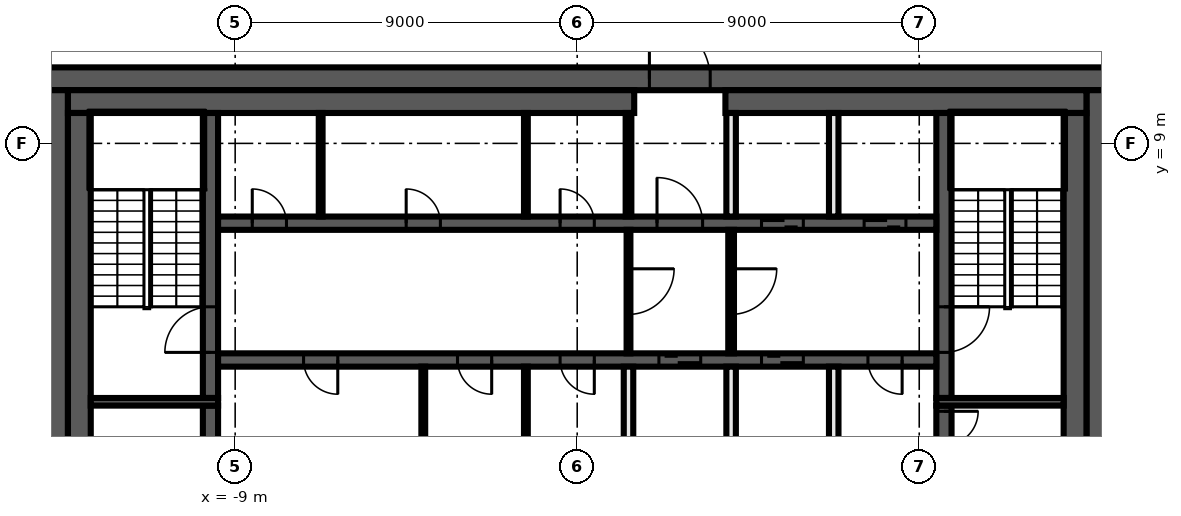
"""IFC4 building model, lengths in metres.
Left out: names, types, materials, properties, quantities, classifications, styles, units other than length and angle.
Written with IfcOpenShell. Run it as: python <this file> out.ifc"""

import sys

from ifc_helpers import new_model, si_unit, direction, frame, frame_2d, origin, place, context, subcontext, project, spatial, rectangle, extrude, element, fill, save


model = new_model("IFC4")
c1 = context("Model", 3, precision=1e-05, world=origin(), true_north=direction((0.0, 1.0)))
c2 = subcontext(c1, "Body", "Model", "MODEL_VIEW")
j1 = project(units=[si_unit("LENGTHUNIT", "METRE"), si_unit("PLANEANGLEUNIT", "RADIAN")], contexts=[c1])
p1 = place(None, origin())
s1 = spatial("IfcSite", under=j1, at=p1, CompositionType="ELEMENT")
p2 = place(p1, origin())
s2 = spatial("IfcBuilding", under=s1, at=p2, CompositionType="ELEMENT")
p3 = place(p2, frame((0.0, 0.0, 311.0)))
s3 = spatial("IfcBuildingStorey", under=s2, at=p3, CompositionType="ELEMENT", Elevation=311.0)
p4 = place(p3, frame((-14.0, 10.7, 0.0), z_axis=(0.0, 0.0, 1.0), x_axis=(1.0, 0.0, 0.0)))
e1 = element("IfcWall", 1, at=p4, inside=s3, PredefinedType="SHEAR", context=c2, shape_type="SweptSolid", body=[
    extrude(rectangle(XDim=28.0, YDim=0.6, at=frame_2d((14.0, 0.0))), origin(), (0.0, 0.0, 1.0), 3.82),
])
p5 = place(p4, frame((15.9, 0.0, 0.0)))
e2 = element("IfcOpeningElement", 2, at=p5, cuts=e1, PredefinedType="OPENING", context=c2, shape_type="SweptSolid", body=[
    extrude(rectangle(XDim=1.6, YDim=2.1, at=frame_2d((0.8, 1.05))), frame((0.0, 0.31, 0.0), z_axis=(0.0, -1.0, 0.0), x_axis=(1.0, 0.0, 0.0)), (0.0, 0.0, 1.0), 0.62),
])
for number, where, z_axis, x_axis in (
    (3, (13.7, 10.4, 0.0), (0.0, 0.0, 1.0), (0.0, -1.0, 0.0)),
    (4, (-13.7, -10.4, 0.0), (0.0, 0.0, 1.0), (0.0, 1.0, 0.0)),
):
    element("IfcWall", number, at=place(p3, frame(where, z_axis=z_axis, x_axis=x_axis)), inside=s3, PredefinedType="SHEAR", context=c2, shape_type="SweptSolid", body=[
        extrude(rectangle(XDim=20.8, YDim=0.6, at=frame_2d((10.4, 0.0))), origin(), (0.0, 0.0, 1.0), 3.82),
    ])
p6 = place(p3, frame((-13.4, 10.1, 0.0), z_axis=(0.0, 0.0, 1.0), x_axis=(1.0, 0.0, 0.0)))
e5 = element("IfcWall", 5, at=p6, inside=s3, PredefinedType="SHEAR", context=c2, shape_type="SweptSolid", body=[
    extrude(rectangle(XDim=14.9, YDim=0.6, at=frame_2d((7.45, 0.0))), origin(), (0.0, 0.0, 1.0), 3.82),
])
p7 = place(p3, frame((3.9, 10.1, 0.0), z_axis=(0.0, 0.0, 1.0), x_axis=(1.0, 0.0, 0.0)))
e6 = element("IfcWall", 6, at=p7, inside=s3, PredefinedType="SHEAR", context=c2, shape_type="SweptSolid", body=[
    extrude(rectangle(XDim=9.5, YDim=0.6, at=frame_2d((4.75, 0.0))), origin(), (0.0, 0.0, 1.0), 3.82),
])
for number, where, z_axis, x_axis in (
    (7, (13.1, 9.8, 0.0), (0.0, 0.0, 1.0), (0.0, -1.0, 0.0)),
    (8, (-13.1, -9.8, 0.0), (0.0, 0.0, 1.0), (0.0, 1.0, 0.0)),
):
    element("IfcWall", number, at=place(p3, frame(where, z_axis=z_axis, x_axis=x_axis)), inside=s3, PredefinedType="SHEAR", context=c2, shape_type="SweptSolid", body=[
        extrude(rectangle(XDim=19.6, YDim=0.6, at=frame_2d((9.8, 0.0))), origin(), (0.0, 0.0, 1.0), 3.82),
    ])
p8 = place(p3, frame((9.65, 2.1, 0.0), z_axis=(0.0, 0.0, 1.0), x_axis=(0.0, -1.0, 0.0)))
e9 = element("IfcWall", 9, at=p8, inside=s3, PredefinedType="SHEAR", context=c2, shape_type="SweptSolid", body=[
    extrude(rectangle(XDim=4.2, YDim=0.4, at=frame_2d((2.1, 0.0))), origin(), (0.0, 0.0, 1.0), 3.82),
])
p9 = place(p8, frame((0.15, 0.0, 0.0)))
e10 = element("IfcOpeningElement", 10, at=p9, cuts=e9, PredefinedType="OPENING", context=c2, shape_type="SweptSolid", body=[
    extrude(rectangle(XDim=0.9, YDim=2.1, at=frame_2d((0.45, 1.05))), frame((0.0, 0.21, 0.0), z_axis=(0.0, -1.0, 0.0), x_axis=(1.0, 0.0, 0.0)), (0.0, 0.0, 1.0), 0.42),
])
p10 = place(p3, frame((9.65, 9.8, 0.0), z_axis=(0.0, 0.0, 1.0), x_axis=(0.0, -1.0, 0.0)))
e11 = element("IfcWall", 11, at=p10, inside=s3, PredefinedType="SHEAR", context=c2, shape_type="SweptSolid", body=[
    extrude(rectangle(XDim=7.5, YDim=0.4, at=frame_2d((3.75, 0.0))), origin(), (0.0, 0.0, 1.0), 3.82),
])
p11 = place(p10, frame((5.1, 0.0, 0.0)))
e12 = element("IfcOpeningElement", 12, at=p11, cuts=e11, PredefinedType="OPENING", context=c2, shape_type="SweptSolid", body=[
    extrude(rectangle(XDim=1.2, YDim=2.1, at=frame_2d((0.6, 1.05))), frame((0.0, 0.21, 0.0), z_axis=(0.0, -1.0, 0.0), x_axis=(1.0, 0.0, 0.0)), (0.0, 0.0, 1.0), 0.42),
])
p12 = place(p3, frame((-9.65, -2.1, 0.0), z_axis=(0.0, 0.0, 1.0), x_axis=(0.0, 1.0, 0.0)))
e13 = element("IfcWall", 13, at=p12, inside=s3, PredefinedType="SHEAR", context=c2, shape_type="SweptSolid", body=[
    extrude(rectangle(XDim=4.2, YDim=0.4, at=frame_2d((2.1, 0.0))), origin(), (0.0, 0.0, 1.0), 3.82),
])
p13 = place(p3, frame((-9.65, 2.3, 0.0), z_axis=(0.0, 0.0, 1.0), x_axis=(0.0, 1.0, 0.0)))
e14 = element("IfcWall", 14, at=p13, inside=s3, PredefinedType="SHEAR", context=c2, shape_type="SweptSolid", body=[
    extrude(rectangle(XDim=7.5, YDim=0.4, at=frame_2d((3.75, 0.0))), origin(), (0.0, 0.0, 1.0), 3.82),
])
p14 = place(p13, frame((1.2, 0.0, 0.0)))
e15 = element("IfcOpeningElement", 15, at=p14, cuts=e14, PredefinedType="OPENING", context=c2, shape_type="SweptSolid", body=[
    extrude(rectangle(XDim=1.2, YDim=2.1, at=frame_2d((0.6, 1.05))), frame((0.0, 0.21, 0.0), z_axis=(0.0, -1.0, 0.0), x_axis=(1.0, 0.0, 0.0)), (0.0, 0.0, 1.0), 0.42),
])
for number, where, z_axis, x_axis in (
    (16, (9.45, 2.2, 0.0), (0.0, 0.0, 1.0), (1.0, 0.0, 0.0)),
    (17, (-9.45, 2.2, 0.0), (0.0, 0.0, 1.0), (-1.0, 0.0, 0.0)),
):
    element("IfcWall", number, at=place(p3, frame(where, z_axis=z_axis, x_axis=x_axis)), inside=s3, PredefinedType="SHEAR", context=c2, shape_type="SweptSolid", body=[
        extrude(rectangle(XDim=3.35, YDim=0.2, at=frame_2d((1.675, 0.0))), origin(), (0.0, 0.0, 1.0), 3.82),
    ])
p15 = place(p3, frame((-9.45, 6.9, 0.0), z_axis=(0.0, 0.0, 1.0), x_axis=(1.0, 0.0, 0.0)))
e18 = element("IfcWall", 18, at=p15, inside=s3, PredefinedType="SHEAR", context=c2, shape_type="SweptSolid", body=[
    extrude(rectangle(XDim=18.9, YDim=0.35, at=frame_2d((9.45, 0.0))), origin(), (0.0, 0.0, 1.0), 3.82),
])
p16 = place(p15, frame((11.55, 0.0, 0.0)))
e19 = element("IfcOpeningElement", 19, at=p16, cuts=e18, PredefinedType="OPENING", context=c2, shape_type="SweptSolid", body=[
    extrude(rectangle(XDim=1.2, YDim=2.1, at=frame_2d((0.6, 1.05))), frame((0.0, 0.185, 0.0), z_axis=(0.0, -1.0, 0.0), x_axis=(1.0, 0.0, 0.0)), (0.0, 0.0, 1.0), 0.37),
])
p17 = place(p15, frame((14.3, 0.0, 0.0)))
e20 = element("IfcOpeningElement", 20, at=p17, cuts=e18, PredefinedType="OPENING", context=c2, shape_type="SweptSolid", body=[
    extrude(rectangle(XDim=1.1, YDim=2.1, at=frame_2d((0.55, 1.05))), frame((0.0, 0.185, 0.0), z_axis=(0.0, -1.0, 0.0), x_axis=(1.0, 0.0, 0.0)), (0.0, 0.0, 1.0), 0.37),
])
p18 = place(p15, frame((17.0, 0.0, 0.0)))
e21 = element("IfcOpeningElement", 21, at=p18, cuts=e18, PredefinedType="OPENING", context=c2, shape_type="SweptSolid", body=[
    extrude(rectangle(XDim=1.1, YDim=2.1, at=frame_2d((0.55, 1.05))), frame((0.0, 0.185, 0.0), z_axis=(0.0, -1.0, 0.0), x_axis=(1.0, 0.0, 0.0)), (0.0, 0.0, 1.0), 0.37),
])
p19 = place(p15, frame((0.9, 0.0, 0.0)))
e22 = element("IfcOpeningElement", 22, at=p19, cuts=e18, PredefinedType="OPENING", context=c2, shape_type="SweptSolid", body=[
    extrude(rectangle(XDim=0.9, YDim=2.1, at=frame_2d((0.45, 1.05))), frame((0.0, 0.185, 0.0), z_axis=(0.0, -1.0, 0.0), x_axis=(1.0, 0.0, 0.0)), (0.0, 0.0, 1.0), 0.37),
])
p20 = place(p15, frame((4.95, 0.0, 0.0)))
e23 = element("IfcOpeningElement", 23, at=p20, cuts=e18, PredefinedType="OPENING", context=c2, shape_type="SweptSolid", body=[
    extrude(rectangle(XDim=0.9, YDim=2.1, at=frame_2d((0.45, 1.05))), frame((0.0, 0.185, 0.0), z_axis=(0.0, -1.0, 0.0), x_axis=(1.0, 0.0, 0.0)), (0.0, 0.0, 1.0), 0.37),
])
p21 = place(p15, frame((9.0, 0.0, 0.0)))
e24 = element("IfcOpeningElement", 24, at=p21, cuts=e18, PredefinedType="OPENING", context=c2, shape_type="SweptSolid", body=[
    extrude(rectangle(XDim=0.9, YDim=2.1, at=frame_2d((0.45, 1.05))), frame((0.0, 0.185, 0.0), z_axis=(0.0, -1.0, 0.0), x_axis=(1.0, 0.0, 0.0)), (0.0, 0.0, 1.0), 0.37),
])
p22 = place(p3, frame((9.45, 3.3, 0.0), z_axis=(0.0, 0.0, 1.0), x_axis=(-1.0, 0.0, 0.0)))
e25 = element("IfcWall", 25, at=p22, inside=s3, PredefinedType="SHEAR", context=c2, shape_type="SweptSolid", body=[
    extrude(rectangle(XDim=18.9, YDim=0.35, at=frame_2d((9.45, 0.0))), origin(), (0.0, 0.0, 1.0), 3.82),
])
p23 = place(p22, frame((6.2, 0.0, 0.0)))
e26 = element("IfcOpeningElement", 26, at=p23, cuts=e25, PredefinedType="OPENING", context=c2, shape_type="SweptSolid", body=[
    extrude(rectangle(XDim=1.1, YDim=2.1, at=frame_2d((0.55, 1.05))), frame((0.0, 0.185, 0.0), z_axis=(0.0, -1.0, 0.0), x_axis=(1.0, 0.0, 0.0)), (0.0, 0.0, 1.0), 0.37),
])
p24 = place(p22, frame((3.5, 0.0, 0.0)))
e27 = element("IfcOpeningElement", 27, at=p24, cuts=e25, PredefinedType="OPENING", context=c2, shape_type="SweptSolid", body=[
    extrude(rectangle(XDim=1.1, YDim=2.1, at=frame_2d((0.55, 1.05))), frame((0.0, 0.185, 0.0), z_axis=(0.0, -1.0, 0.0), x_axis=(1.0, 0.0, 0.0)), (0.0, 0.0, 1.0), 0.37),
])
p25 = place(p22, frame((0.9, 0.0, 0.0)))
e28 = element("IfcOpeningElement", 28, at=p25, cuts=e25, PredefinedType="OPENING", context=c2, shape_type="SweptSolid", body=[
    extrude(rectangle(XDim=0.9, YDim=2.1, at=frame_2d((0.45, 1.05))), frame((0.0, 0.185, 0.0), z_axis=(0.0, -1.0, 0.0), x_axis=(1.0, 0.0, 0.0)), (0.0, 0.0, 1.0), 0.37),
])
p26 = place(p22, frame((15.75, 0.0, 0.0)))
e29 = element("IfcOpeningElement", 29, at=p26, cuts=e25, PredefinedType="OPENING", context=c2, shape_type="SweptSolid", body=[
    extrude(rectangle(XDim=0.9, YDim=2.1, at=frame_2d((0.45, 1.05))), frame((0.0, 0.185, 0.0), z_axis=(0.0, -1.0, 0.0), x_axis=(1.0, 0.0, 0.0)), (0.0, 0.0, 1.0), 0.37),
])
p27 = place(p22, frame((11.7, 0.0, 0.0)))
e30 = element("IfcOpeningElement", 30, at=p27, cuts=e25, PredefinedType="OPENING", context=c2, shape_type="SweptSolid", body=[
    extrude(rectangle(XDim=0.9, YDim=2.1, at=frame_2d((0.45, 1.05))), frame((0.0, 0.185, 0.0), z_axis=(0.0, -1.0, 0.0), x_axis=(1.0, 0.0, 0.0)), (0.0, 0.0, 1.0), 0.37),
])
p28 = place(p22, frame((9.0, 0.0, 0.0)))
e31 = element("IfcOpeningElement", 31, at=p28, cuts=e25, PredefinedType="OPENING", context=c2, shape_type="SweptSolid", body=[
    extrude(rectangle(XDim=0.9, YDim=2.1, at=frame_2d((0.45, 1.05))), frame((0.0, 0.185, 0.0), z_axis=(0.0, -1.0, 0.0), x_axis=(1.0, 0.0, 0.0)), (0.0, 0.0, 1.0), 0.37),
])
for number, where, z_axis, x_axis in (
    (32, (6.75, 0.4, 0.0), (0.0, 0.0, 1.0), (0.0, 1.0, 0.0)),
    (33, (6.75, 7.075, 0.0), (0.0, 0.0, 1.0), (0.0, 1.0, 0.0)),
):
    element("IfcWall", number, at=place(p3, frame(where, z_axis=z_axis, x_axis=x_axis)), inside=s3, PredefinedType="SOLIDWALL", context=c2, shape_type="SweptSolid", body=[
        extrude(rectangle(XDim=2.725, YDim=0.25, at=frame_2d((1.363, 0.0))), origin(), (0.0, 0.0, 1.0), 3.82),
    ])
p29 = place(p3, frame((4.05, 6.725, 0.0), z_axis=(0.0, 0.0, 1.0), x_axis=(0.0, -1.0, 0.0)))
e34 = element("IfcWall", 34, at=p29, inside=s3, PredefinedType="PARTITIONING", context=c2, shape_type="SweptSolid", body=[
    extrude(rectangle(XDim=3.25, YDim=0.15, at=frame_2d((1.625, 0.0))), origin(), (0.0, 0.0, 1.0), 3.82),
])
p30 = place(p29, frame((1.025, 0.0, 0.0)))
e35 = element("IfcOpeningElement", 35, at=p30, cuts=e34, PredefinedType="OPENING", context=c2, shape_type="SweptSolid", body=[
    extrude(rectangle(XDim=1.2, YDim=2.1, at=frame_2d((0.6, 1.05))), frame((0.0, 0.085, 0.0), z_axis=(0.0, -1.0, 0.0), x_axis=(1.0, 0.0, 0.0)), (0.0, 0.0, 1.0), 0.17),
])
for number, where, z_axis, x_axis in (
    (36, (4.05, 0.4, 0.0), (0.0, 0.0, 1.0), (0.0, 1.0, 0.0)),
    (37, (4.05, 7.075, 0.0), (0.0, 0.0, 1.0), (0.0, 1.0, 0.0)),
):
    element("IfcWall", number, at=place(p3, frame(where, z_axis=z_axis, x_axis=x_axis)), inside=s3, PredefinedType="SOLIDWALL", context=c2, shape_type="SweptSolid", body=[
        extrude(rectangle(XDim=2.725, YDim=0.25, at=frame_2d((1.363, 0.0))), origin(), (0.0, 0.0, 1.0), 3.82),
    ])
p31 = place(p3, frame((1.35, 7.075, 0.0), z_axis=(0.0, 0.0, 1.0), x_axis=(0.0, 1.0, 0.0)))
e38 = element("IfcWall", 38, at=p31, inside=s3, PredefinedType="PARTITIONING", context=c2, shape_type="SweptSolid", body=[
    extrude(rectangle(XDim=2.725, YDim=0.15, at=frame_2d((1.363, 0.0))), origin(), (0.0, 0.0, 1.0), 3.82),
])
p32 = place(p3, frame((1.35, 6.725, 0.0), z_axis=(0.0, 0.0, 1.0), x_axis=(0.0, -1.0, 0.0)))
e39 = element("IfcWall", 39, at=p32, inside=s3, PredefinedType="PARTITIONING", context=c2, shape_type="SweptSolid", body=[
    extrude(rectangle(XDim=3.25, YDim=0.1, at=frame_2d((1.625, 0.0))), origin(), (0.0, 0.0, 1.0), 3.82),
])
p33 = place(p32, frame((1.025, 0.0, 0.0)))
e40 = element("IfcOpeningElement", 40, at=p33, cuts=e39, PredefinedType="OPENING", context=c2, shape_type="SweptSolid", body=[
    extrude(rectangle(XDim=1.2, YDim=2.1, at=frame_2d((0.6, 1.05))), frame((0.0, 0.06, 0.0), z_axis=(0.0, -1.0, 0.0), x_axis=(1.0, 0.0, 0.0)), (0.0, 0.0, 1.0), 0.12),
])
p34 = place(p3, frame((1.35, 0.4, 0.0), z_axis=(0.0, 0.0, 1.0), x_axis=(0.0, 1.0, 0.0)))
e41 = element("IfcWall", 41, at=p34, inside=s3, PredefinedType="SOLIDWALL", context=c2, shape_type="SweptSolid", body=[
    extrude(rectangle(XDim=2.725, YDim=0.25, at=frame_2d((1.363, 0.0))), origin(), (0.0, 0.0, 1.0), 3.82),
])
for number, where, z_axis, x_axis in (
    (42, (-1.35, 0.4, 0.0), (0.0, 0.0, 1.0), (0.0, 1.0, 0.0)),
    (43, (-1.35, 7.075, 0.0), (0.0, 0.0, 1.0), (0.0, 1.0, 0.0)),
    (44, (-4.05, 0.4, 0.0), (0.0, 0.0, 1.0), (0.0, 1.0, 0.0)),
    (45, (-6.75, 7.075, 0.0), (0.0, 0.0, 1.0), (0.0, 1.0, 0.0)),
):
    element("IfcWall", number, at=place(p3, frame(where, z_axis=z_axis, x_axis=x_axis)), inside=s3, PredefinedType="PARTITIONING", context=c2, shape_type="SweptSolid", body=[
        extrude(rectangle(XDim=2.725, YDim=0.1, at=frame_2d((1.363, 0.0))), origin(), (0.0, 0.0, 1.0), 3.82),
    ])
p35 = place(p9, origin())
e46 = element("IfcDoor", 46, at=p35, inside=s3, OperationType="SINGLE_SWING_RIGHT", PredefinedType="DOOR", context=c2, shape_type="SweptSolid", body=[
    extrude(rectangle(XDim=0.9, YDim=2.1, at=frame_2d((0.45, 1.05))), frame((0.0, 0.025, 0.0), z_axis=(0.0, -1.0, 0.0), x_axis=(1.0, 0.0, 0.0)), (0.0, 0.0, 1.0), 0.05),
])
fill(e10, e46)
p36 = place(p5, origin())
e47 = element("IfcDoor", 47, at=p36, inside=s3, OperationType="DOUBLE_DOOR_SINGLE_SWING", PredefinedType="DOOR", context=c2, shape_type="SweptSolid", body=[
    extrude(rectangle(XDim=1.6, YDim=2.1, at=frame_2d((0.8, 1.05))), frame((0.0, 0.025, 0.0), z_axis=(0.0, -1.0, 0.0), x_axis=(1.0, 0.0, 0.0)), (0.0, 0.0, 1.0), 0.05),
])
fill(e2, e47)
p37 = place(p16, origin())
e48 = element("IfcDoor", 48, at=p37, inside=s3, OperationType="SINGLE_SWING_LEFT", PredefinedType="DOOR", context=c2, shape_type="SweptSolid", body=[
    extrude(rectangle(XDim=1.2, YDim=2.1, at=frame_2d((0.6, 1.05))), frame((0.0, 0.025, 0.0), z_axis=(0.0, -1.0, 0.0), x_axis=(1.0, 0.0, 0.0)), (0.0, 0.0, 1.0), 0.05),
])
fill(e19, e48)
p38 = place(p17, origin())
e49 = element("IfcDoor", 49, at=p38, inside=s3, OperationType="DOUBLE_DOOR_SLIDING", PredefinedType="DOOR", context=c2, shape_type="SweptSolid", body=[
    extrude(rectangle(XDim=1.1, YDim=2.1, at=frame_2d((0.55, 1.05))), frame((0.0, 0.025, 0.0), z_axis=(0.0, -1.0, 0.0), x_axis=(1.0, 0.0, 0.0)), (0.0, 0.0, 1.0), 0.05),
])
fill(e20, e49)
p39 = place(p18, origin())
e50 = element("IfcDoor", 50, at=p39, inside=s3, OperationType="DOUBLE_DOOR_SLIDING", PredefinedType="DOOR", context=c2, shape_type="SweptSolid", body=[
    extrude(rectangle(XDim=1.1, YDim=2.1, at=frame_2d((0.55, 1.05))), frame((0.0, 0.025, 0.0), z_axis=(0.0, -1.0, 0.0), x_axis=(1.0, 0.0, 0.0)), (0.0, 0.0, 1.0), 0.05),
])
fill(e21, e50)
p40 = place(p23, origin())
e51 = element("IfcDoor", 51, at=p40, inside=s3, OperationType="DOUBLE_DOOR_SLIDING", PredefinedType="DOOR", context=c2, shape_type="SweptSolid", body=[
    extrude(rectangle(XDim=1.1, YDim=2.1, at=frame_2d((0.55, 1.05))), frame((0.0, 0.025, 0.0), z_axis=(0.0, -1.0, 0.0), x_axis=(1.0, 0.0, 0.0)), (0.0, 0.0, 1.0), 0.05),
])
fill(e26, e51)
p41 = place(p24, origin())
e52 = element("IfcDoor", 52, at=p41, inside=s3, OperationType="DOUBLE_DOOR_SLIDING", PredefinedType="DOOR", context=c2, shape_type="SweptSolid", body=[
    extrude(rectangle(XDim=1.1, YDim=2.1, at=frame_2d((0.55, 1.05))), frame((0.0, 0.025, 0.0), z_axis=(0.0, -1.0, 0.0), x_axis=(1.0, 0.0, 0.0)), (0.0, 0.0, 1.0), 0.05),
])
fill(e27, e52)
p42 = place(p25, origin())
e53 = element("IfcDoor", 53, at=p42, inside=s3, OperationType="SINGLE_SWING_LEFT", PredefinedType="DOOR", context=c2, shape_type="SweptSolid", body=[
    extrude(rectangle(XDim=0.9, YDim=2.1, at=frame_2d((0.45, 1.05))), frame((0.0, 0.025, 0.0), z_axis=(0.0, -1.0, 0.0), x_axis=(1.0, 0.0, 0.0)), (0.0, 0.0, 1.0), 0.05),
])
fill(e28, e53)
p43 = place(p19, origin())
e54 = element("IfcDoor", 54, at=p43, inside=s3, OperationType="SINGLE_SWING_RIGHT", PredefinedType="DOOR", context=c2, shape_type="SweptSolid", body=[
    extrude(rectangle(XDim=0.9, YDim=2.1, at=frame_2d((0.45, 1.05))), frame((0.0, 0.025, 0.0), z_axis=(0.0, -1.0, 0.0), x_axis=(1.0, 0.0, 0.0)), (0.0, 0.0, 1.0), 0.05),
])
fill(e22, e54)
p44 = place(p20, origin())
e55 = element("IfcDoor", 55, at=p44, inside=s3, OperationType="SINGLE_SWING_LEFT", PredefinedType="DOOR", context=c2, shape_type="SweptSolid", body=[
    extrude(rectangle(XDim=0.9, YDim=2.1, at=frame_2d((0.45, 1.05))), frame((0.0, 0.025, 0.0), z_axis=(0.0, -1.0, 0.0), x_axis=(1.0, 0.0, 0.0)), (0.0, 0.0, 1.0), 0.05),
])
fill(e23, e55)
p45 = place(p21, origin())
e56 = element("IfcDoor", 56, at=p45, inside=s3, OperationType="SINGLE_SWING_RIGHT", PredefinedType="DOOR", context=c2, shape_type="SweptSolid", body=[
    extrude(rectangle(XDim=0.9, YDim=2.1, at=frame_2d((0.45, 1.05))), frame((0.0, 0.025, 0.0), z_axis=(0.0, -1.0, 0.0), x_axis=(1.0, 0.0, 0.0)), (0.0, 0.0, 1.0), 0.05),
])
fill(e24, e56)
p46 = place(p26, origin())
e57 = element("IfcDoor", 57, at=p46, inside=s3, OperationType="SINGLE_SWING_LEFT", PredefinedType="DOOR", context=c2, shape_type="SweptSolid", body=[
    extrude(rectangle(XDim=0.9, YDim=2.1, at=frame_2d((0.45, 1.05))), frame((0.0, 0.025, 0.0), z_axis=(0.0, -1.0, 0.0), x_axis=(1.0, 0.0, 0.0)), (0.0, 0.0, 1.0), 0.05),
])
fill(e29, e57)
p47 = place(p27, origin())
e58 = element("IfcDoor", 58, at=p47, inside=s3, OperationType="SINGLE_SWING_RIGHT", PredefinedType="DOOR", context=c2, shape_type="SweptSolid", body=[
    extrude(rectangle(XDim=0.9, YDim=2.1, at=frame_2d((0.45, 1.05))), frame((0.0, 0.025, 0.0), z_axis=(0.0, -1.0, 0.0), x_axis=(1.0, 0.0, 0.0)), (0.0, 0.0, 1.0), 0.05),
])
fill(e30, e58)
p48 = place(p28, origin())
e59 = element("IfcDoor", 59, at=p48, inside=s3, OperationType="SINGLE_SWING_LEFT", PredefinedType="DOOR", context=c2, shape_type="SweptSolid", body=[
    extrude(rectangle(XDim=0.9, YDim=2.1, at=frame_2d((0.45, 1.05))), frame((0.0, 0.025, 0.0), z_axis=(0.0, -1.0, 0.0), x_axis=(1.0, 0.0, 0.0)), (0.0, 0.0, 1.0), 0.05),
])
fill(e31, e59)
p49 = place(p11, origin())
e60 = element("IfcDoor", 60, at=p49, inside=s3, OperationType="SINGLE_SWING_LEFT", PredefinedType="DOOR", context=c2, shape_type="SweptSolid", body=[
    extrude(rectangle(XDim=1.2, YDim=2.1, at=frame_2d((0.6, 1.05))), frame((0.0, 0.025, 0.0), z_axis=(0.0, -1.0, 0.0), x_axis=(1.0, 0.0, 0.0)), (0.0, 0.0, 1.0), 0.05),
])
fill(e12, e60)
p50 = place(p14, origin())
e61 = element("IfcDoor", 61, at=p50, inside=s3, OperationType="SINGLE_SWING_RIGHT", PredefinedType="DOOR", context=c2, shape_type="SweptSolid", body=[
    extrude(rectangle(XDim=1.2, YDim=2.1, at=frame_2d((0.6, 1.05))), frame((0.0, 0.025, 0.0), z_axis=(0.0, -1.0, 0.0), x_axis=(1.0, 0.0, 0.0)), (0.0, 0.0, 1.0), 0.05),
])
fill(e15, e61)
p51 = place(p33, origin())
e62 = element("IfcDoor", 62, at=p51, inside=s3, OperationType="SINGLE_SWING_LEFT", PredefinedType="DOOR", context=c2, shape_type="SweptSolid", body=[
    extrude(rectangle(XDim=1.2, YDim=2.1, at=frame_2d((0.6, 1.05))), frame((0.0, 0.025, 0.0), z_axis=(0.0, -1.0, 0.0), x_axis=(1.0, 0.0, 0.0)), (0.0, 0.0, 1.0), 0.05),
])
fill(e40, e62)
p52 = place(p30, origin())
e63 = element("IfcDoor", 63, at=p52, inside=s3, OperationType="SINGLE_SWING_RIGHT", PredefinedType="DOOR", context=c2, shape_type="SweptSolid", body=[
    extrude(rectangle(XDim=1.2, YDim=2.1, at=frame_2d((0.6, 1.05))), frame((0.0, 0.025, 0.0), z_axis=(0.0, -1.0, 0.0), x_axis=(1.0, 0.0, 0.0)), (0.0, 0.0, 1.0), 0.05),
])
fill(e35, e63)
save(model, sys.argv[1])
